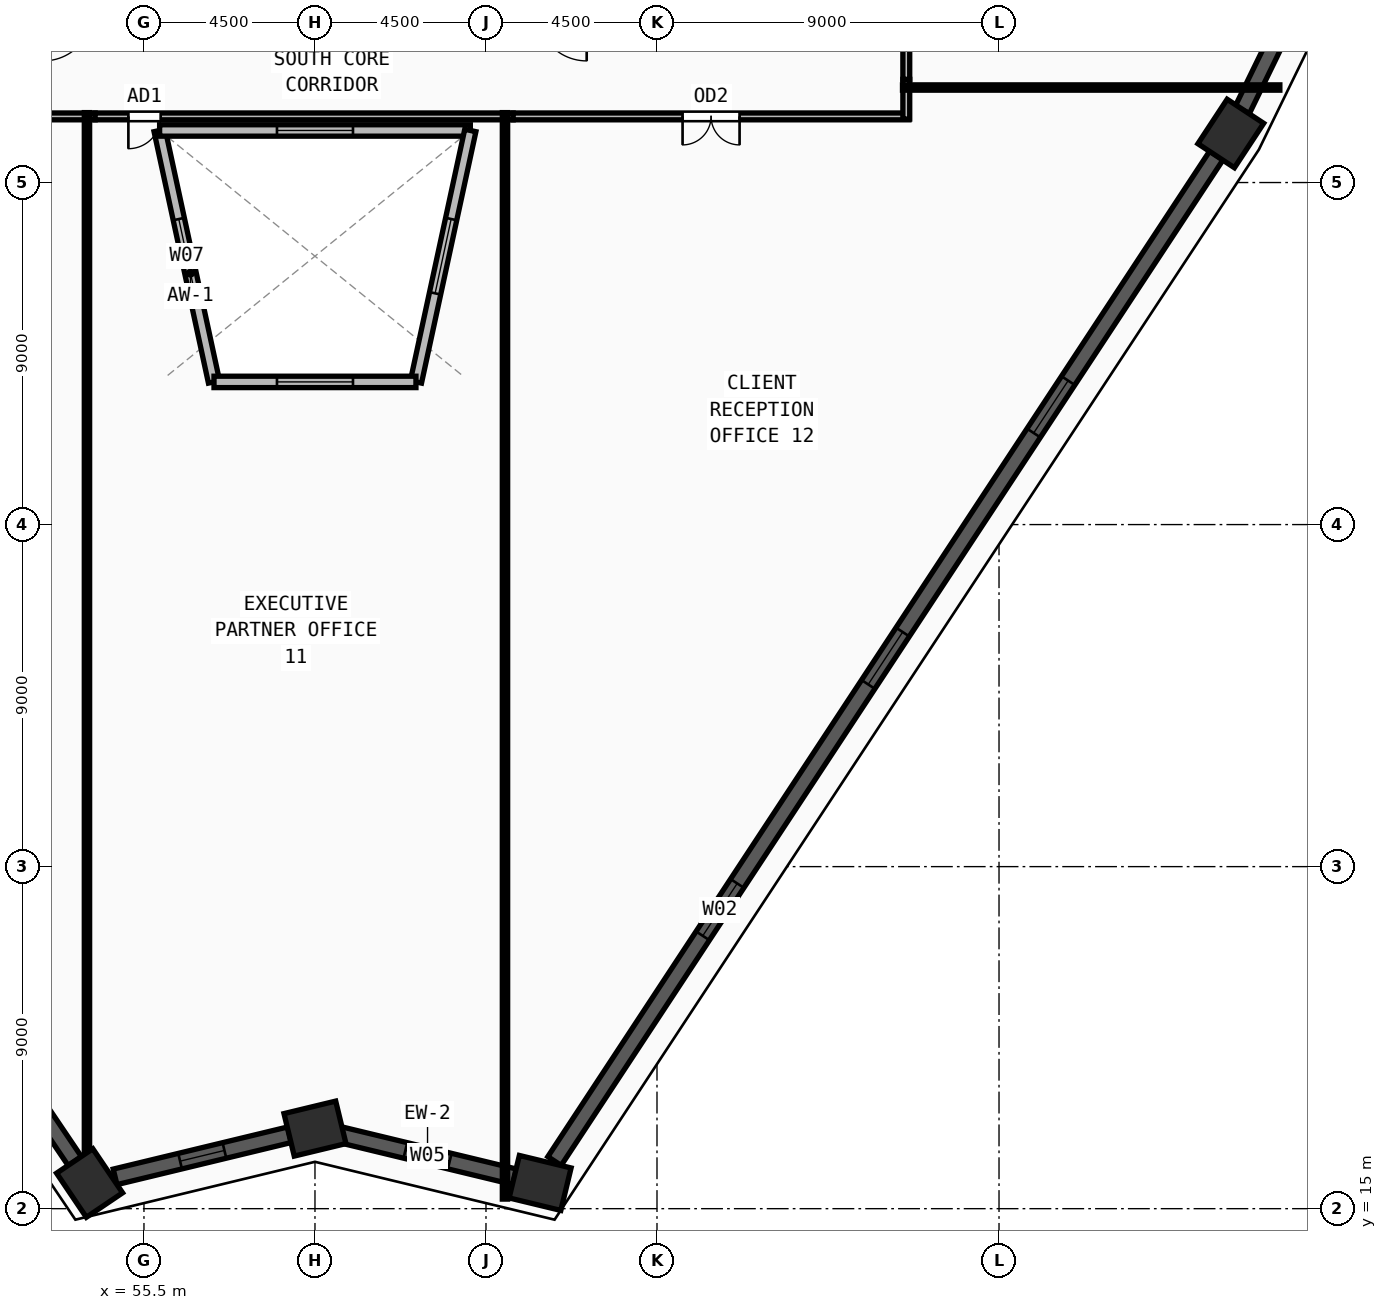
"""IFC4 building model, lengths in metres.
Left out: names, types, materials, properties, quantities, classifications, styles, units other than length and angle.
Written with IfcOpenShell. Run it as: python <this file> out.ifc"""

import sys

from ifc_helpers import new_model, si_unit, direction, frame, frame_2d, origin, origin_2d, place, context, subcontext, project, spatial, rectangle, extrude, source, transform, mapped, element, fill, save


model = new_model("IFC4")
c1 = context("Model", 3, precision=1e-05, world=origin(), true_north=direction((0.0, 1.0)))
c2 = subcontext(c1, "Body", "Model", "MODEL_VIEW")
j1 = project(units=[si_unit("LENGTHUNIT", "METRE"), si_unit("PLANEANGLEUNIT", "RADIAN")], contexts=[c1])
p1 = place(None, origin())
s1 = spatial("IfcSite", under=j1, at=p1, CompositionType="ELEMENT")
p2 = place(p1, origin())
s2 = spatial("IfcBuilding", under=s1, at=p2, CompositionType="ELEMENT")
p3 = place(p2, frame((0.0, 0.0, 124.5)))
s3 = spatial("IfcBuildingStorey", under=s2, at=p3, CompositionType="ELEMENT", Elevation=124.5)
m1 = source(origin(), c2, "Body", "SweptSolid", [
    extrude(rectangle(XDim=1.4, YDim=1.15, at=origin_2d()), origin(), (0.0, 0.0, 1.0), 3.75),
])
for number, where, z_axis, x_axis in (
    (1, (54.069, 15.675, 0.0), (0.0, 0.0, 1.0), (-0.559, 0.829, 0.0)),
    (2, (84.099, 43.29, 0.0), (0.0, 0.0, 1.0), (0.55, 0.835, 0.0)),
    (3, (65.924, 15.677, 0.0), (0.0, 0.0, 1.0), (-0.972, 0.235, 0.0)),
    (4, (60.0, 17.107, 0.0), (0.0, 0.0, 1.0), (0.972, 0.235, 0.0)),
):
    element("IfcColumn", number, at=place(p3, frame(where, z_axis=z_axis, x_axis=x_axis)), inside=s3, PredefinedType="COLUMN", context=c2, shape_type="MappedRepresentation", body=[
        mapped(m1, transform((0.0, 0.0, 0.0), x_axis=(1.0, 0.0, 0.0), y_axis=(0.0, 1.0, 0.0), z_axis=(0.0, 0.0, 1.0), scale=1.0)),
    ])
p4 = place(p3, frame((60.671, 16.945, 0.0), z_axis=(0.0, 0.0, 1.0), x_axis=(0.972084652769, -0.234630406918, 0.0)))
e5 = element("IfcWall", 5, at=p4, inside=s3, PredefinedType="SOLIDWALL", context=c2, shape_type="SweptSolid", body=[
    extrude(rectangle(XDim=4.714, YDim=0.42, at=frame_2d((2.357, 0.0))), origin(), (0.0, 0.0, 1.0), 3.57),
])
m2 = source(origin(), c2, "Body", "SweptSolid", [
    extrude(rectangle(XDim=1.2, YDim=1.9, at=frame_2d((0.6, 0.95))), frame((0.0, 0.22, 0.0), z_axis=(0.0, -1.0, 0.0), x_axis=(1.0, 0.0, 0.0)), (0.0, 0.0, 1.0), 0.44),
])
p5 = place(p4, frame((1.757, 0.0, 0.55)))
e6 = element("IfcOpeningElement", 6, at=p5, cuts=e5, PredefinedType="OPENING", context=c2, shape_type="MappedRepresentation", body=[
    mapped(m2, transform((0.0, 0.0, 0.0), x_axis=(1.0, 0.0, 0.0), y_axis=(0.0, 1.0, 0.0), z_axis=(0.0, 0.0, 1.0), scale=1.0)),
])
p6 = place(p3, frame((66.303, 16.253, 0.0), z_axis=(0.0, 0.0, 1.0), x_axis=(0.549799789037, 0.835296469509, 0.0)))
e7 = element("IfcWall", 7, at=p6, inside=s3, PredefinedType="SOLIDWALL", context=c2, shape_type="SweptSolid", body=[
    extrude(rectangle(XDim=31.679, YDim=0.42, at=frame_2d((15.839, 0.0))), origin(), (0.0, 0.0, 1.0), 3.57),
])
m3 = source(origin(), c2, "Body", "SweptSolid", [
    extrude(rectangle(XDim=1.65, YDim=1.95, at=frame_2d((0.825, 0.975))), frame((0.0, 0.22, 0.0), z_axis=(0.0, -1.0, 0.0), x_axis=(1.0, 0.0, 0.0)), (0.0, 0.0, 1.0), 0.44),
])
p7 = place(p6, frame((7.095, 0.0, 0.55)))
e8 = element("IfcOpeningElement", 8, at=p7, cuts=e7, PredefinedType="OPENING", context=c2, shape_type="MappedRepresentation", body=[
    mapped(m3, transform((0.0, 0.0, 0.0), x_axis=(1.0, 0.0, 0.0), y_axis=(0.0, 1.0, 0.0), z_axis=(0.0, 0.0, 1.0), scale=1.0)),
])
p8 = place(p6, frame((15.014, 0.0, 0.55)))
e9 = element("IfcOpeningElement", 9, at=p8, cuts=e7, PredefinedType="OPENING", context=c2, shape_type="MappedRepresentation", body=[
    mapped(m3, transform((0.0, 0.0, 0.0), x_axis=(1.0, 0.0, 0.0), y_axis=(0.0, 1.0, 0.0), z_axis=(0.0, 0.0, 1.0), scale=1.0)),
])
p9 = place(p6, frame((22.934, 0.0, 0.55)))
e10 = element("IfcOpeningElement", 10, at=p9, cuts=e7, PredefinedType="OPENING", context=c2, shape_type="MappedRepresentation", body=[
    mapped(m3, transform((0.0, 0.0, 0.0), x_axis=(1.0, 0.0, 0.0), y_axis=(0.0, 1.0, 0.0), z_axis=(0.0, 0.0, 1.0), scale=1.0)),
])
p10 = place(p3, frame((84.401, 43.91, 0.0), z_axis=(0.0, 0.0, 1.0), x_axis=(0.438149799109, 0.898901971041, 0.0)))
e11 = element("IfcWall", 11, at=p10, inside=s3, PredefinedType="SOLIDWALL", context=c2, shape_type="SweptSolid", body=[
    extrude(rectangle(XDim=26.14, YDim=0.42, at=frame_2d((13.07, 0.0))), origin(), (0.0, 0.0, 1.0), 3.57),
])
p11 = place(p10, frame((5.71, 0.0, 0.55)))
e12 = element("IfcOpeningElement", 12, at=p11, cuts=e11, PredefinedType="OPENING", context=c2, shape_type="MappedRepresentation", body=[
    mapped(m3, transform((0.0, 0.0, 0.0), x_axis=(1.0, 0.0, 0.0), y_axis=(0.0, 1.0, 0.0), z_axis=(0.0, 0.0, 1.0), scale=1.0)),
])
p12 = place(p10, frame((18.78, 0.0, 0.55)))
e13 = element("IfcOpeningElement", 13, at=p12, cuts=e11, PredefinedType="OPENING", context=c2, shape_type="MappedRepresentation", body=[
    mapped(m3, transform((0.0, 0.0, 0.0), x_axis=(1.0, 0.0, 0.0), y_axis=(0.0, 1.0, 0.0), z_axis=(0.0, 0.0, 1.0), scale=1.0)),
])
p13 = place(p3, frame((39.06, 37.913, 0.0), z_axis=(0.0, 0.0, 1.0), x_axis=(0.559433071817, -0.828875526335, 0.0)))
e14 = element("IfcWall", 14, at=p13, inside=s3, PredefinedType="SOLIDWALL", context=c2, shape_type="SweptSolid", body=[
    extrude(rectangle(XDim=26.139, YDim=0.42, at=frame_2d((13.07, 0.0))), origin(), (0.0, 0.0, 1.0), 3.57),
])
p14 = place(p13, frame((5.71, 0.0, 0.55)))
e15 = element("IfcOpeningElement", 15, at=p14, cuts=e14, PredefinedType="OPENING", context=c2, shape_type="MappedRepresentation", body=[
    mapped(m3, transform((0.0, 0.0, 0.0), x_axis=(1.0, 0.0, 0.0), y_axis=(0.0, 1.0, 0.0), z_axis=(0.0, 0.0, 1.0), scale=1.0)),
])
p15 = place(p13, frame((12.245, 0.0, 0.55)))
e16 = element("IfcOpeningElement", 16, at=p15, cuts=e14, PredefinedType="OPENING", context=c2, shape_type="MappedRepresentation", body=[
    mapped(m3, transform((0.0, 0.0, 0.0), x_axis=(1.0, 0.0, 0.0), y_axis=(0.0, 1.0, 0.0), z_axis=(0.0, 0.0, 1.0), scale=1.0)),
])
p16 = place(p13, frame((18.779, 0.0, 0.55)))
e17 = element("IfcOpeningElement", 17, at=p16, cuts=e14, PredefinedType="OPENING", context=c2, shape_type="MappedRepresentation", body=[
    mapped(m3, transform((0.0, 0.0, 0.0), x_axis=(1.0, 0.0, 0.0), y_axis=(0.0, 1.0, 0.0), z_axis=(0.0, 0.0, 1.0), scale=1.0)),
])
p17 = place(p3, frame((54.74, 15.837, 0.0), z_axis=(0.0, 0.0, 1.0), x_axis=(0.972061054332, 0.234728154791, 0.0)))
e18 = element("IfcWall", 18, at=p17, inside=s3, PredefinedType="SOLIDWALL", context=c2, shape_type="SweptSolid", body=[
    extrude(rectangle(XDim=4.721, YDim=0.42, at=frame_2d((2.36, 0.0))), origin(), (0.0, 0.0, 1.0), 3.57),
])
p18 = place(p17, frame((1.76, 0.0, 0.55)))
e19 = element("IfcOpeningElement", 19, at=p18, cuts=e18, PredefinedType="OPENING", context=c2, shape_type="MappedRepresentation", body=[
    mapped(m2, transform((0.0, 0.0, 0.0), x_axis=(1.0, 0.0, 0.0), y_axis=(0.0, 1.0, 0.0), z_axis=(0.0, 0.0, 1.0), scale=1.0)),
])
p19 = place(p3, frame((57.343, 36.754, 0.0), z_axis=(0.0, 0.0, 1.0), x_axis=(-0.21138587267, 0.977402687144, 0.0)))
e20 = element("IfcWall", 20, at=p19, inside=s3, PredefinedType="SOLIDWALL", context=c2, shape_type="SweptSolid", body=[
    extrude(rectangle(XDim=6.769, YDim=0.3, at=frame_2d((3.385, 0.0))), origin(), (0.0, 0.0, 1.0), 3.57),
])
m4 = source(origin(), c2, "Body", "SweptSolid", [
    extrude(rectangle(XDim=2.0, YDim=1.9, at=frame_2d((1.0, 0.95))), frame((0.0, 0.16, 0.0), z_axis=(0.0, -1.0, 0.0), x_axis=(1.0, 0.0, 0.0)), (0.0, 0.0, 1.0), 0.32),
])
p20 = place(p19, frame((2.384, 0.0, 0.55)))
e21 = element("IfcOpeningElement", 21, at=p20, cuts=e20, PredefinedType="OPENING", context=c2, shape_type="MappedRepresentation", body=[
    mapped(m4, transform((0.0, 0.0, 0.0), x_axis=(1.0, 0.0, 0.0), y_axis=(0.0, 1.0, 0.0), z_axis=(0.0, 0.0, 1.0), scale=1.0)),
])
p21 = place(p3, frame((55.912, 43.37, 0.0), z_axis=(0.0, 0.0, 1.0), x_axis=(1.0, 0.0, 0.0)))
e22 = element("IfcWall", 22, at=p21, inside=s3, PredefinedType="SOLIDWALL", context=c2, shape_type="SweptSolid", body=[
    extrude(rectangle(XDim=8.176, YDim=0.3, at=frame_2d((4.088, 0.0))), origin(), (0.0, 0.0, 1.0), 3.57),
])
p22 = place(p21, frame((3.088, 0.0, 0.55)))
e23 = element("IfcOpeningElement", 23, at=p22, cuts=e22, PredefinedType="OPENING", context=c2, shape_type="MappedRepresentation", body=[
    mapped(m4, transform((0.0, 0.0, 0.0), x_axis=(1.0, 0.0, 0.0), y_axis=(0.0, 1.0, 0.0), z_axis=(0.0, 0.0, 1.0), scale=1.0)),
])
p23 = place(p3, frame((64.088, 43.37, 0.0), z_axis=(0.0, 0.0, 1.0), x_axis=(-0.21138587267, -0.977402687144, 0.0)))
e24 = element("IfcWall", 24, at=p23, inside=s3, PredefinedType="SOLIDWALL", context=c2, shape_type="SweptSolid", body=[
    extrude(rectangle(XDim=6.769, YDim=0.3, at=frame_2d((3.385, 0.0))), origin(), (0.0, 0.0, 1.0), 3.57),
])
p24 = place(p23, frame((2.384, 0.0, 0.55)))
e25 = element("IfcOpeningElement", 25, at=p24, cuts=e24, PredefinedType="OPENING", context=c2, shape_type="MappedRepresentation", body=[
    mapped(m4, transform((0.0, 0.0, 0.0), x_axis=(1.0, 0.0, 0.0), y_axis=(0.0, 1.0, 0.0), z_axis=(0.0, 0.0, 1.0), scale=1.0)),
])
p25 = place(p3, frame((62.657, 36.754, 0.0), z_axis=(0.0, 0.0, 1.0), x_axis=(-1.0, 0.0, 0.0)))
e26 = element("IfcWall", 26, at=p25, inside=s3, PredefinedType="SOLIDWALL", context=c2, shape_type="SweptSolid", body=[
    extrude(rectangle(XDim=5.314, YDim=0.3, at=frame_2d((2.657, 0.0))), origin(), (0.0, 0.0, 1.0), 3.57),
])
p26 = place(p25, frame((1.657, 0.0, 0.55)))
e27 = element("IfcOpeningElement", 27, at=p26, cuts=e26, PredefinedType="OPENING", context=c2, shape_type="MappedRepresentation", body=[
    mapped(m4, transform((0.0, 0.0, 0.0), x_axis=(1.0, 0.0, 0.0), y_axis=(0.0, 1.0, 0.0), z_axis=(0.0, 0.0, 1.0), scale=1.0)),
])
p27 = place(p3, frame((54.215, 43.74, 0.0), z_axis=(0.0, 0.0, 1.0), x_axis=(-1.0, 0.0, 0.0)))
e28 = element("IfcWall", 28, at=p27, inside=s3, PredefinedType="PARTITIONING", context=c2, shape_type="SweptSolid", body=[
    extrude(rectangle(XDim=9.845, YDim=0.18, at=frame_2d((4.922, 0.0))), origin(), (0.0, 0.0, 1.0), 3.57),
])
m5 = source(origin(), c2, "Body", "SweptSolid", [
    extrude(rectangle(XDim=1.5, YDim=2.2, at=frame_2d((0.75, 1.1))), frame((0.0, 0.1, 0.0), z_axis=(0.0, -1.0, 0.0), x_axis=(1.0, 0.0, 0.0)), (0.0, 0.0, 1.0), 0.2),
])
p28 = place(p27, frame((4.173, 0.0, 0.0)))
e29 = element("IfcOpeningElement", 29, at=p28, cuts=e28, PredefinedType="OPENING", context=c2, shape_type="MappedRepresentation", body=[
    mapped(m5, transform((0.0, 0.0, 0.0), x_axis=(1.0, 0.0, 0.0), y_axis=(0.0, 1.0, 0.0), z_axis=(0.0, 0.0, 1.0), scale=1.0)),
])
p29 = place(p3, frame((65.215, 43.74, 0.0), z_axis=(0.0, 0.0, 1.0), x_axis=(-1.0, 0.0, 0.0)))
e30 = element("IfcWall", 30, at=p29, inside=s3, PredefinedType="PARTITIONING", context=c2, shape_type="SweptSolid", body=[
    extrude(rectangle(XDim=11.0, YDim=0.18, at=frame_2d((5.5, 0.0))), origin(), (0.0, 0.0, 1.0), 3.57),
])
m6 = source(origin(), c2, "Body", "SweptSolid", [
    extrude(rectangle(XDim=0.85, YDim=2.1, at=frame_2d((0.425, 1.05))), frame((0.0, 0.1, 0.0), z_axis=(0.0, -1.0, 0.0), x_axis=(1.0, 0.0, 0.0)), (0.0, 0.0, 1.0), 0.2),
])
p30 = place(p29, frame((9.275, 0.0, 0.0)))
e31 = element("IfcOpeningElement", 31, at=p30, cuts=e30, PredefinedType="OPENING", context=c2, shape_type="MappedRepresentation", body=[
    mapped(m6, transform((0.0, 0.0, 0.0), x_axis=(1.0, 0.0, 0.0), y_axis=(0.0, 1.0, 0.0), z_axis=(0.0, 0.0, 1.0), scale=1.0)),
])
p31 = place(p3, frame((75.63, 43.74, 0.0), z_axis=(0.0, 0.0, 1.0), x_axis=(-1.0, 0.0, 0.0)))
e32 = element("IfcWall", 32, at=p31, inside=s3, PredefinedType="PARTITIONING", context=c2, shape_type="SweptSolid", body=[
    extrude(rectangle(XDim=10.415, YDim=0.18, at=frame_2d((5.208, 0.0))), origin(), (0.0, 0.0, 1.0), 3.57),
])
p32 = place(p31, frame((4.457, 0.0, 0.0)))
e33 = element("IfcOpeningElement", 33, at=p32, cuts=e32, PredefinedType="OPENING", context=c2, shape_type="MappedRepresentation", body=[
    mapped(m5, transform((0.0, 0.0, 0.0), x_axis=(1.0, 0.0, 0.0), y_axis=(0.0, 1.0, 0.0), z_axis=(0.0, 0.0, 1.0), scale=1.0)),
])
p33 = place(p3, frame((75.56, 44.715, 0.0), z_axis=(0.0, 0.0, 1.0), x_axis=(0.0, -1.0, 0.0)))
e34 = element("IfcWall", 34, at=p33, inside=s3, PredefinedType="PARTITIONING", context=c2, shape_type="SweptSolid", body=[
    extrude(rectangle(XDim=1.045, YDim=0.18, at=frame_2d((0.522, 0.0))), origin(), (0.0, 0.0, 1.0), 3.57),
])
p34 = place(p3, frame((75.56, 54.01, 0.0), z_axis=(0.0, 0.0, 1.0), x_axis=(0.0, -1.0, 0.0)))
e35 = element("IfcWall", 35, at=p34, inside=s3, PredefinedType="PARTITIONING", context=c2, shape_type="SweptSolid", body=[
    extrude(rectangle(XDim=9.295, YDim=0.18, at=frame_2d((4.647, 0.0))), origin(), (0.0, 0.0, 1.0), 3.155),
])
p35 = place(p3, frame((75.46, 44.5, 0.0), z_axis=(0.0, 0.0, 1.0), x_axis=(1.0, 0.0, 0.0)))
e36 = element("IfcWall", 36, at=p35, inside=s3, PredefinedType="PARTITIONING", context=c2, shape_type="SweptSolid", body=[
    extrude(rectangle(XDim=9.93, YDim=0.14, at=frame_2d((4.965, 0.0))), origin(), (0.0, 0.0, 1.0), 3.57),
])
p36 = place(p3, frame((54.0, 43.84, 0.0), z_axis=(0.0, 0.0, 1.0), x_axis=(0.0, -1.0, 0.0)))
e37 = element("IfcWall", 37, at=p36, inside=s3, PredefinedType="PARTITIONING", context=c2, shape_type="SweptSolid", body=[
    extrude(rectangle(XDim=28.83, YDim=0.14, at=frame_2d((14.415, 0.0))), origin(), (0.0, 0.0, 1.0), 2.755),
])
p37 = place(p3, frame((65.0, 43.84, 0.0), z_axis=(0.0, 0.0, 1.0), x_axis=(0.0, -1.0, 0.0)))
e38 = element("IfcWall", 38, at=p37, inside=s3, PredefinedType="PARTITIONING", context=c2, shape_type="SweptSolid", body=[
    extrude(rectangle(XDim=28.588, YDim=0.14, at=frame_2d((14.294, 0.0))), origin(), (0.0, 0.0, 1.0), 3.57),
])
m7 = source(origin(), c2, "Body", "SweptSolid", [
    extrude(rectangle(XDim=1.2, YDim=1.9, at=frame_2d((0.6, 0.95))), frame((0.0, 0.03, 0.0), z_axis=(0.0, -1.0, 0.0), x_axis=(1.0, 0.0, 0.0)), (0.0, 0.0, 1.0), 0.06),
])
p38 = place(p5, origin())
e39 = element("IfcWindow", 39, at=p38, inside=s3, PartitioningType="SINGLE_PANEL", PredefinedType="WINDOW", context=c2, shape_type="MappedRepresentation", body=[
    mapped(m7, transform((0.0, 0.0, 0.0), x_axis=(1.0, 0.0, 0.0), y_axis=(0.0, 1.0, 0.0), z_axis=(0.0, 0.0, 1.0), scale=1.0)),
])
fill(e6, e39)
m8 = source(origin(), c2, "Body", "SweptSolid", [
    extrude(rectangle(XDim=1.65, YDim=1.95, at=frame_2d((0.825, 0.975))), frame((0.0, 0.03, 0.0), z_axis=(0.0, -1.0, 0.0), x_axis=(1.0, 0.0, 0.0)), (0.0, 0.0, 1.0), 0.06),
])
p39 = place(p7, origin())
e40 = element("IfcWindow", 40, at=p39, inside=s3, PartitioningType="DOUBLE_PANEL_VERTICAL", PredefinedType="WINDOW", context=c2, shape_type="MappedRepresentation", body=[
    mapped(m8, transform((0.0, 0.0, 0.0), x_axis=(1.0, 0.0, 0.0), y_axis=(0.0, 1.0, 0.0), z_axis=(0.0, 0.0, 1.0), scale=1.0)),
])
fill(e8, e40)
p40 = place(p8, origin())
e41 = element("IfcWindow", 41, at=p40, inside=s3, PartitioningType="DOUBLE_PANEL_VERTICAL", PredefinedType="WINDOW", context=c2, shape_type="MappedRepresentation", body=[
    mapped(m8, transform((0.0, 0.0, 0.0), x_axis=(1.0, 0.0, 0.0), y_axis=(0.0, 1.0, 0.0), z_axis=(0.0, 0.0, 1.0), scale=1.0)),
])
fill(e9, e41)
p41 = place(p9, origin())
e42 = element("IfcWindow", 42, at=p41, inside=s3, PartitioningType="DOUBLE_PANEL_VERTICAL", PredefinedType="WINDOW", context=c2, shape_type="MappedRepresentation", body=[
    mapped(m8, transform((0.0, 0.0, 0.0), x_axis=(1.0, 0.0, 0.0), y_axis=(0.0, 1.0, 0.0), z_axis=(0.0, 0.0, 1.0), scale=1.0)),
])
fill(e10, e42)
p42 = place(p18, origin())
e43 = element("IfcWindow", 43, at=p42, inside=s3, PartitioningType="SINGLE_PANEL", PredefinedType="WINDOW", context=c2, shape_type="MappedRepresentation", body=[
    mapped(m7, transform((0.0, 0.0, 0.0), x_axis=(1.0, 0.0, 0.0), y_axis=(0.0, 1.0, 0.0), z_axis=(0.0, 0.0, 1.0), scale=1.0)),
])
fill(e19, e43)
m9 = source(origin(), c2, "Body", "SweptSolid", [
    extrude(rectangle(XDim=2.0, YDim=1.9, at=frame_2d((1.0, 0.95))), frame((0.0, 0.03, 0.0), z_axis=(0.0, -1.0, 0.0), x_axis=(1.0, 0.0, 0.0)), (0.0, 0.0, 1.0), 0.06),
])
p43 = place(p20, origin())
e44 = element("IfcWindow", 44, at=p43, inside=s3, PartitioningType="DOUBLE_PANEL_VERTICAL", PredefinedType="WINDOW", context=c2, shape_type="MappedRepresentation", body=[
    mapped(m9, transform((0.0, 0.0, 0.0), x_axis=(1.0, 0.0, 0.0), y_axis=(0.0, 1.0, 0.0), z_axis=(0.0, 0.0, 1.0), scale=1.0)),
])
fill(e21, e44)
p44 = place(p22, origin())
e45 = element("IfcWindow", 45, at=p44, inside=s3, PartitioningType="DOUBLE_PANEL_VERTICAL", PredefinedType="WINDOW", context=c2, shape_type="MappedRepresentation", body=[
    mapped(m9, transform((0.0, 0.0, 0.0), x_axis=(1.0, 0.0, 0.0), y_axis=(0.0, 1.0, 0.0), z_axis=(0.0, 0.0, 1.0), scale=1.0)),
])
fill(e23, e45)
p45 = place(p24, origin())
e46 = element("IfcWindow", 46, at=p45, inside=s3, PartitioningType="DOUBLE_PANEL_VERTICAL", PredefinedType="WINDOW", context=c2, shape_type="MappedRepresentation", body=[
    mapped(m9, transform((0.0, 0.0, 0.0), x_axis=(1.0, 0.0, 0.0), y_axis=(0.0, 1.0, 0.0), z_axis=(0.0, 0.0, 1.0), scale=1.0)),
])
fill(e25, e46)
p46 = place(p26, origin())
e47 = element("IfcWindow", 47, at=p46, inside=s3, PartitioningType="DOUBLE_PANEL_VERTICAL", PredefinedType="WINDOW", context=c2, shape_type="MappedRepresentation", body=[
    mapped(m9, transform((0.0, 0.0, 0.0), x_axis=(1.0, 0.0, 0.0), y_axis=(0.0, 1.0, 0.0), z_axis=(0.0, 0.0, 1.0), scale=1.0)),
])
fill(e27, e47)
m10 = source(origin(), c2, "Body", "SweptSolid", [
    extrude(rectangle(XDim=0.85, YDim=2.1, at=frame_2d((0.425, 1.05))), frame((0.0, 0.025, 0.0), z_axis=(0.0, -1.0, 0.0), x_axis=(1.0, 0.0, 0.0)), (0.0, 0.0, 1.0), 0.05),
])
p47 = place(p30, origin())
e48 = element("IfcDoor", 48, at=p47, inside=s3, OperationType="SINGLE_SWING_RIGHT", PredefinedType="DOOR", context=c2, shape_type="MappedRepresentation", body=[
    mapped(m10, transform((0.0, 0.0, 0.0), x_axis=(1.0, 0.0, 0.0), y_axis=(0.0, 1.0, 0.0), z_axis=(0.0, 0.0, 1.0), scale=1.0)),
])
fill(e31, e48)
m11 = source(origin(), c2, "Body", "SweptSolid", [
    extrude(rectangle(XDim=1.5, YDim=2.2, at=frame_2d((0.75, 1.1))), frame((0.0, 0.025, 0.0), z_axis=(0.0, -1.0, 0.0), x_axis=(1.0, 0.0, 0.0)), (0.0, 0.0, 1.0), 0.05),
])
p48 = place(p32, origin())
e49 = element("IfcDoor", 49, at=p48, inside=s3, OperationType="DOUBLE_DOOR_SINGLE_SWING", PredefinedType="DOOR", context=c2, shape_type="MappedRepresentation", body=[
    mapped(m11, transform((0.0, 0.0, 0.0), x_axis=(1.0, 0.0, 0.0), y_axis=(0.0, 1.0, 0.0), z_axis=(0.0, 0.0, 1.0), scale=1.0)),
])
fill(e33, e49)
save(model, sys.argv[1])
